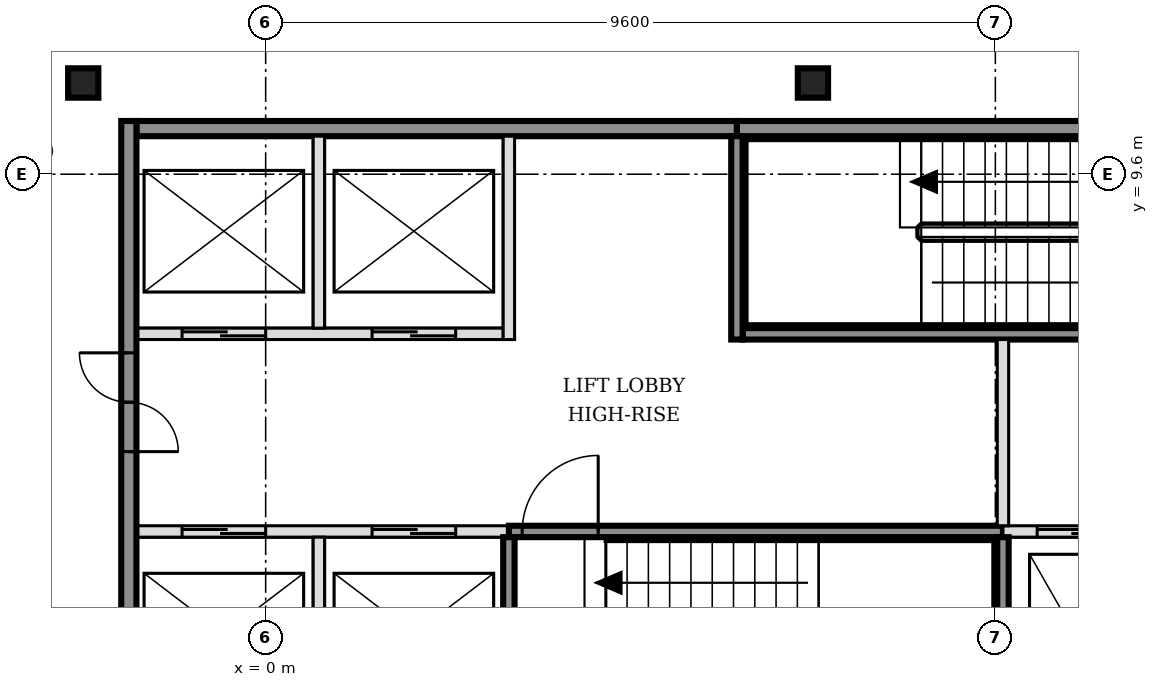
"""IFC4 building model, lengths in metres.
Left out: names, types, materials, properties, quantities, classifications, styles, units other than length and angle.
Written with IfcOpenShell. Run it as: python <this file> out.ifc"""

import sys

from ifc_helpers import new_model, si_unit, direction, frame, frame_2d, origin, origin_2d, place, context, subcontext, project, spatial, rectangle, i_section, extrude, element, fill, save


model = new_model("IFC4")
c1 = context("Model", 3, precision=1e-05, world=origin(), true_north=direction((0.0, 1.0)))
c2 = subcontext(c1, "Body", "Model", "MODEL_VIEW")
j1 = project(units=[si_unit("LENGTHUNIT", "METRE"), si_unit("PLANEANGLEUNIT", "RADIAN")], contexts=[c1])
p1 = place(None, origin())
s1 = spatial("IfcSite", under=j1, at=p1, CompositionType="ELEMENT")
p2 = place(p1, origin())
s2 = spatial("IfcBuilding", under=s1, at=p2, CompositionType="ELEMENT")
p3 = place(p2, frame((0.0, 0.0, 239.4)))
s3 = spatial("IfcBuildingStorey", under=s2, at=p3, CompositionType="ELEMENT", Elevation=239.4)
for number, where, z_axis, x_axis in (
    (1, (-2.4, 10.8, -0.15), (0.0, 0.0, 1.0), (1.0, 0.0, 0.0)),
    (2, (7.2, 10.8, -0.15), (0.0, 0.0, 1.0), (1.0, 0.0, 0.0)),
):
    element("IfcColumn", number, at=place(p3, frame(where, z_axis=z_axis, x_axis=x_axis)), inside=s3, PredefinedType="COLUMN", context=c2, shape_type="SweptSolid", body=[
        extrude(i_section(OverallWidth=0.398, OverallDepth=0.387, WebThickness=0.021, FlangeThickness=0.033, FilletRadius=0.015, at=origin_2d()), origin(), (0.0, 0.0, 1.0), 3.6),
    ])
p4 = place(p3, frame((-1.7, 4.9, 0.0), z_axis=(0.0, 0.0, 1.0), x_axis=(1.0, 0.0, 0.0)))
e3 = element("IfcWall", 3, at=p4, inside=s3, PredefinedType="SOLIDWALL", context=c2, shape_type="SweptSolid", body=[
    extrude(rectangle(XDim=4.9, YDim=0.15, at=frame_2d((2.45, 0.0))), origin(), (0.0, 0.0, 1.0), 3.45),
])
p5 = place(p4, frame((0.6, 0.0, 0.0)))
e4 = element("IfcOpeningElement", 4, at=p5, cuts=e3, PredefinedType="OPENING", context=c2, shape_type="SweptSolid", body=[
    extrude(rectangle(XDim=1.1, YDim=2.1, at=frame_2d((0.55, 1.05))), frame((0.0, 0.085, 0.0), z_axis=(0.0, -1.0, 0.0), x_axis=(1.0, 0.0, 0.0)), (0.0, 0.0, 1.0), 0.17),
])
p6 = place(p4, frame((3.1, 0.0, 0.0)))
e5 = element("IfcOpeningElement", 5, at=p6, cuts=e3, PredefinedType="OPENING", context=c2, shape_type="SweptSolid", body=[
    extrude(rectangle(XDim=1.1, YDim=2.1, at=frame_2d((0.55, 1.05))), frame((0.0, 0.085, 0.0), z_axis=(0.0, -1.0, 0.0), x_axis=(1.0, 0.0, 0.0)), (0.0, 0.0, 1.0), 0.17),
])
p7 = place(p3, frame((3.2, 4.9, 0.0), z_axis=(0.0, 0.0, 1.0), x_axis=(1.0, 0.0, 0.0)))
e6 = element("IfcWall", 6, at=p7, inside=s3, PredefinedType="SOLIDWALL", context=c2, shape_type="SweptSolid", body=[
    extrude(rectangle(XDim=6.5, YDim=0.15, at=frame_2d((3.25, 0.0))), origin(), (0.0, 0.0, 1.0), 3.45),
])
p8 = place(p7, frame((0.175, 0.0, 0.0)))
e7 = element("IfcOpeningElement", 7, at=p8, cuts=e6, PredefinedType="OPENING", context=c2, shape_type="SweptSolid", body=[
    extrude(rectangle(XDim=1.0, YDim=2.1, at=frame_2d((0.5, 1.05))), frame((0.0, 0.085, 0.0), z_axis=(0.0, -1.0, 0.0), x_axis=(1.0, 0.0, 0.0)), (0.0, 0.0, 1.0), 0.17),
])
p9 = place(p3, frame((9.7, 4.9, 0.0), z_axis=(0.0, 0.0, 1.0), x_axis=(1.0, 0.0, 0.0)))
e8 = element("IfcWall", 8, at=p9, inside=s3, PredefinedType="SOLIDWALL", context=c2, shape_type="SweptSolid", body=[
    extrude(rectangle(XDim=6.4, YDim=0.15, at=frame_2d((3.2, 0.0))), origin(), (0.0, 0.0, 1.0), 3.45),
])
p10 = place(p9, frame((0.45, 0.0, 0.0)))
e9 = element("IfcOpeningElement", 9, at=p10, cuts=e8, PredefinedType="OPENING", context=c2, shape_type="SweptSolid", body=[
    extrude(rectangle(XDim=1.0, YDim=2.1, at=frame_2d((0.5, 1.05))), frame((0.0, 0.085, 0.0), z_axis=(0.0, -1.0, 0.0), x_axis=(1.0, 0.0, 0.0)), (0.0, 0.0, 1.0), 0.17),
])
p11 = place(p9, frame((2.35, 0.0, 0.0)))
e10 = element("IfcOpeningElement", 10, at=p11, cuts=e8, PredefinedType="OPENING", context=c2, shape_type="SweptSolid", body=[
    extrude(rectangle(XDim=1.0, YDim=2.1, at=frame_2d((0.5, 1.05))), frame((0.0, 0.085, 0.0), z_axis=(0.0, -1.0, 0.0), x_axis=(1.0, 0.0, 0.0)), (0.0, 0.0, 1.0), 0.17),
])
p12 = place(p9, frame((4.7, 0.0, 0.0)))
e11 = element("IfcOpeningElement", 11, at=p12, cuts=e8, PredefinedType="OPENING", context=c2, shape_type="SweptSolid", body=[
    extrude(rectangle(XDim=0.9, YDim=2.1, at=frame_2d((0.45, 1.05))), frame((0.0, 0.085, 0.0), z_axis=(0.0, -1.0, 0.0), x_axis=(1.0, 0.0, 0.0)), (0.0, 0.0, 1.0), 0.17),
])
p13 = place(p3, frame((-1.7, 7.5, 0.0), z_axis=(0.0, 0.0, 1.0), x_axis=(1.0, 0.0, 0.0)))
e12 = element("IfcWall", 12, at=p13, inside=s3, PredefinedType="SOLIDWALL", context=c2, shape_type="SweptSolid", body=[
    extrude(rectangle(XDim=4.825, YDim=0.15, at=frame_2d((2.413, 0.0))), origin(), (0.0, 0.0, 1.0), 3.45),
])
p14 = place(p13, frame((0.6, 0.0, 0.0)))
e13 = element("IfcOpeningElement", 13, at=p14, cuts=e12, PredefinedType="OPENING", context=c2, shape_type="SweptSolid", body=[
    extrude(rectangle(XDim=1.1, YDim=2.1, at=frame_2d((0.55, 1.05))), frame((0.0, 0.085, 0.0), z_axis=(0.0, -1.0, 0.0), x_axis=(1.0, 0.0, 0.0)), (0.0, 0.0, 1.0), 0.17),
])
p15 = place(p13, frame((3.1, 0.0, 0.0)))
e14 = element("IfcOpeningElement", 14, at=p15, cuts=e12, PredefinedType="OPENING", context=c2, shape_type="SweptSolid", body=[
    extrude(rectangle(XDim=1.1, YDim=2.1, at=frame_2d((0.55, 1.05))), frame((0.0, 0.085, 0.0), z_axis=(0.0, -1.0, 0.0), x_axis=(1.0, 0.0, 0.0)), (0.0, 0.0, 1.0), 0.17),
])
p16 = place(p3, frame((6.275, 7.5, 0.0), z_axis=(0.0, 0.0, 1.0), x_axis=(1.0, 0.0, 0.0)))
e15 = element("IfcWall", 15, at=p16, inside=s3, PredefinedType="SOLIDWALL", context=c2, shape_type="SweptSolid", body=[
    extrude(rectangle(XDim=6.425, YDim=0.15, at=frame_2d((3.212, 0.0))), origin(), (0.0, 0.0, 1.0), 3.45),
])
p17 = place(p16, frame((5.225, 0.0, 0.0)))
e16 = element("IfcOpeningElement", 16, at=p17, cuts=e15, PredefinedType="OPENING", context=c2, shape_type="SweptSolid", body=[
    extrude(rectangle(XDim=1.0, YDim=2.1, at=frame_2d((0.5, 1.05))), frame((0.0, 0.085, 0.0), z_axis=(0.0, -1.0, 0.0), x_axis=(1.0, 0.0, 0.0)), (0.0, 0.0, 1.0), 0.17),
])
p18 = place(p3, frame((-1.7, 10.2, 0.0), z_axis=(0.0, 0.0, 1.0), x_axis=(1.0, 0.0, 0.0)))
e17 = element("IfcWall", 17, at=p18, inside=s3, PredefinedType="SOLIDWALL", context=c2, shape_type="SweptSolid", body=[
    extrude(rectangle(XDim=7.9, YDim=0.2, at=frame_2d((3.95, 0.0))), origin(), (0.0, 0.0, 1.0), 3.45),
])
p19 = place(p3, frame((6.2, 10.2, 0.0), z_axis=(0.0, 0.0, 1.0), x_axis=(1.0, 0.0, 0.0)))
e18 = element("IfcWall", 18, at=p19, inside=s3, PredefinedType="SOLIDWALL", context=c2, shape_type="SweptSolid", body=[
    extrude(rectangle(XDim=6.5, YDim=0.2, at=frame_2d((3.25, 0.0))), origin(), (0.0, 0.0, 1.0), 3.45),
])
p20 = place(p3, frame((-1.8, -5.5, 0.0), z_axis=(0.0, 0.0, 1.0), x_axis=(0.0, 1.0, 0.0)))
e19 = element("IfcWall", 19, at=p20, inside=s3, PredefinedType="SOLIDWALL", context=c2, shape_type="SweptSolid", body=[
    extrude(rectangle(XDim=15.8, YDim=0.2, at=frame_2d((7.9, 0.0))), origin(), (0.0, 0.0, 1.0), 3.45),
])
p21 = place(p20, frame((3.05, 0.0, 0.0)))
e20 = element("IfcOpeningElement", 20, at=p21, cuts=e19, PredefinedType="OPENING", context=c2, shape_type="SweptSolid", body=[
    extrude(rectangle(XDim=1.3, YDim=2.1, at=frame_2d((0.65, 1.05))), frame((0.0, 0.11, 0.0), z_axis=(0.0, -1.0, 0.0), x_axis=(1.0, 0.0, 0.0)), (0.0, 0.0, 1.0), 0.22),
])
p22 = place(p20, frame((11.45, 0.0, 0.0)))
e21 = element("IfcOpeningElement", 21, at=p22, cuts=e19, PredefinedType="OPENING", context=c2, shape_type="SweptSolid", body=[
    extrude(rectangle(XDim=1.3, YDim=2.1, at=frame_2d((0.65, 1.05))), frame((0.0, 0.11, 0.0), z_axis=(0.0, -1.0, 0.0), x_axis=(1.0, 0.0, 0.0)), (0.0, 0.0, 1.0), 0.22),
])
p23 = place(p3, frame((0.7, 2.275, 0.0), z_axis=(0.0, 0.0, 1.0), x_axis=(0.0, 1.0, 0.0)))
e22 = element("IfcWall", 22, at=p23, inside=s3, PredefinedType="SOLIDWALL", context=c2, shape_type="SweptSolid", body=[
    extrude(rectangle(XDim=2.55, YDim=0.15, at=frame_2d((1.275, 0.0))), origin(), (0.0, 0.0, 1.0), 3.45),
])
p24 = place(p3, frame((0.7, 7.575, 0.0), z_axis=(0.0, 0.0, 1.0), x_axis=(0.0, 1.0, 0.0)))
e23 = element("IfcWall", 23, at=p24, inside=s3, PredefinedType="SOLIDWALL", context=c2, shape_type="SweptSolid", body=[
    extrude(rectangle(XDim=2.525, YDim=0.15, at=frame_2d((1.263, 0.0))), origin(), (0.0, 0.0, 1.0), 3.45),
])
p25 = place(p3, frame((3.2, 2.275, 0.0), z_axis=(0.0, 0.0, 1.0), x_axis=(0.0, 1.0, 0.0)))
e24 = element("IfcWall", 24, at=p25, inside=s3, PredefinedType="SOLIDWALL", context=c2, shape_type="SweptSolid", body=[
    extrude(rectangle(XDim=2.55, YDim=0.15, at=frame_2d((1.275, 0.0))), origin(), (0.0, 0.0, 1.0), 3.45),
])
for number, where, z_axis, x_axis in (
    (25, (3.2, 7.425, 0.0), (0.0, 0.0, 1.0), (0.0, 1.0, 0.0)),
    (26, (6.2, 7.425, 0.0), (0.0, 0.0, 1.0), (0.0, 1.0, 0.0)),
):
    element("IfcWall", number, at=place(p3, frame(where, z_axis=z_axis, x_axis=x_axis)), inside=s3, PredefinedType="SOLIDWALL", context=c2, shape_type="SweptSolid", body=[
        extrude(rectangle(XDim=2.675, YDim=0.15, at=frame_2d((1.337, 0.0))), origin(), (0.0, 0.0, 1.0), 3.45),
    ])
p26 = place(p3, frame((9.7, 2.275, 0.0), z_axis=(0.0, 0.0, 1.0), x_axis=(0.0, 1.0, 0.0)))
e27 = element("IfcWall", 27, at=p26, inside=s3, PredefinedType="SOLIDWALL", context=c2, shape_type="SweptSolid", body=[
    extrude(rectangle(XDim=2.55, YDim=0.15, at=frame_2d((1.275, 0.0))), origin(), (0.0, 0.0, 1.0), 3.45),
])
p27 = place(p3, frame((9.7, 4.975, 0.0), z_axis=(0.0, 0.0, 1.0), x_axis=(0.0, 1.0, 0.0)))
e28 = element("IfcWall", 28, at=p27, inside=s3, PredefinedType="SOLIDWALL", context=c2, shape_type="SweptSolid", body=[
    extrude(rectangle(XDim=2.45, YDim=0.15, at=frame_2d((1.225, 0.0))), origin(), (0.0, 0.0, 1.0), 3.45),
])
p28 = place(p5, origin())
e29 = element("IfcDoor", 29, at=p28, inside=s3, OperationType="DOUBLE_DOOR_SLIDING", PredefinedType="DOOR", context=c2, shape_type="SweptSolid", body=[
    extrude(rectangle(XDim=1.1, YDim=2.1, at=frame_2d((0.55, 1.05))), frame((0.0, 0.025, 0.0), z_axis=(0.0, -1.0, 0.0), x_axis=(1.0, 0.0, 0.0)), (0.0, 0.0, 1.0), 0.05),
])
fill(e4, e29)
p29 = place(p6, origin())
e30 = element("IfcDoor", 30, at=p29, inside=s3, OperationType="DOUBLE_DOOR_SLIDING", PredefinedType="DOOR", context=c2, shape_type="SweptSolid", body=[
    extrude(rectangle(XDim=1.1, YDim=2.1, at=frame_2d((0.55, 1.05))), frame((0.0, 0.025, 0.0), z_axis=(0.0, -1.0, 0.0), x_axis=(1.0, 0.0, 0.0)), (0.0, 0.0, 1.0), 0.05),
])
fill(e5, e30)
p30 = place(p14, origin())
e31 = element("IfcDoor", 31, at=p30, inside=s3, OperationType="DOUBLE_DOOR_SLIDING", PredefinedType="DOOR", context=c2, shape_type="SweptSolid", body=[
    extrude(rectangle(XDim=1.1, YDim=2.1, at=frame_2d((0.55, 1.05))), frame((0.0, 0.025, 0.0), z_axis=(0.0, -1.0, 0.0), x_axis=(1.0, 0.0, 0.0)), (0.0, 0.0, 1.0), 0.05),
])
fill(e13, e31)
p31 = place(p15, origin())
e32 = element("IfcDoor", 32, at=p31, inside=s3, OperationType="DOUBLE_DOOR_SLIDING", PredefinedType="DOOR", context=c2, shape_type="SweptSolid", body=[
    extrude(rectangle(XDim=1.1, YDim=2.1, at=frame_2d((0.55, 1.05))), frame((0.0, 0.025, 0.0), z_axis=(0.0, -1.0, 0.0), x_axis=(1.0, 0.0, 0.0)), (0.0, 0.0, 1.0), 0.05),
])
fill(e14, e32)
p32 = place(p10, origin())
e33 = element("IfcDoor", 33, at=p32, inside=s3, OperationType="DOUBLE_DOOR_SLIDING", PredefinedType="DOOR", context=c2, shape_type="SweptSolid", body=[
    extrude(rectangle(XDim=1.0, YDim=2.1, at=frame_2d((0.5, 1.05))), frame((0.0, 0.025, 0.0), z_axis=(0.0, -1.0, 0.0), x_axis=(1.0, 0.0, 0.0)), (0.0, 0.0, 1.0), 0.05),
])
fill(e9, e33)
p33 = place(p8, origin())
e34 = element("IfcDoor", 34, at=p33, inside=s3, OperationType="SINGLE_SWING_RIGHT", PredefinedType="DOOR", context=c2, shape_type="SweptSolid", body=[
    extrude(rectangle(XDim=1.0, YDim=2.1, at=frame_2d((0.5, 1.05))), frame((0.0, 0.025, 0.0), z_axis=(0.0, -1.0, 0.0), x_axis=(1.0, 0.0, 0.0)), (0.0, 0.0, 1.0), 0.05),
])
fill(e7, e34)
p34 = place(p22, origin())
e35 = element("IfcDoor", 35, at=p34, inside=s3, OperationType="DOUBLE_DOOR_SINGLE_SWING", PredefinedType="DOOR", context=c2, shape_type="SweptSolid", body=[
    extrude(rectangle(XDim=1.3, YDim=2.1, at=frame_2d((0.65, 1.05))), frame((0.0, 0.025, 0.0), z_axis=(0.0, -1.0, 0.0), x_axis=(1.0, 0.0, 0.0)), (0.0, 0.0, 1.0), 0.05),
])
fill(e21, e35)
save(model, sys.argv[1])
